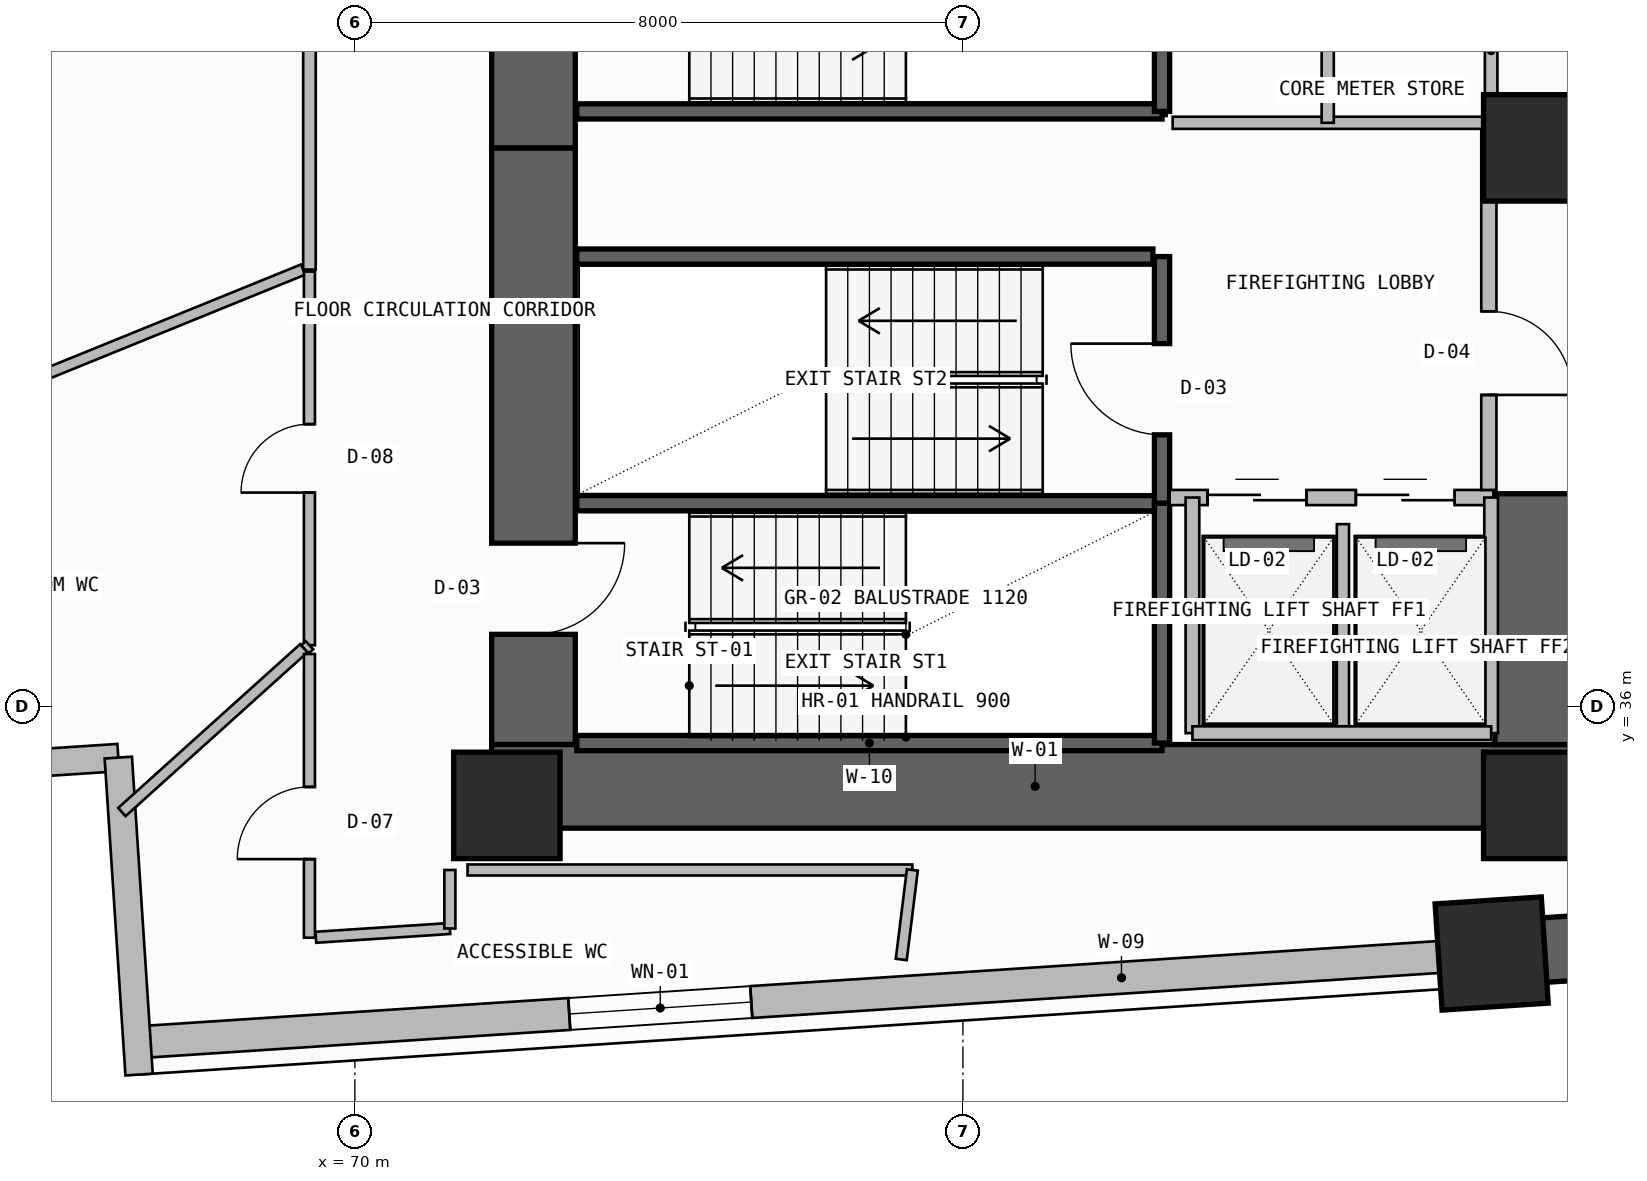
"""IFC4 building model, lengths in metres.
Left out: names, types, materials, properties, quantities, classifications, styles, units other than length and angle.
Written with IfcOpenShell. Run it as: python <this file> out.ifc"""

import sys

from ifc_helpers import new_model, si_unit, direction, frame, frame_2d, origin, origin_2d, place, context, subcontext, project, spatial, rectangle, extrude, element, fill, save


model = new_model("IFC4")
c1 = context("Model", 3, precision=1e-05, world=origin(), true_north=direction((0.0, 1.0)))
c2 = subcontext(c1, "Body", "Model", "MODEL_VIEW")
j1 = project(units=[si_unit("LENGTHUNIT", "METRE"), si_unit("PLANEANGLEUNIT", "RADIAN")], contexts=[c1])
p1 = place(None, origin())
s1 = spatial("IfcSite", under=j1, at=p1, CompositionType="ELEMENT")
p2 = place(p1, origin())
s2 = spatial("IfcBuilding", under=s1, at=p2, CompositionType="ELEMENT")
p3 = place(p2, frame((0.0, 0.0, 77.7)))
s3 = spatial("IfcBuildingStorey", under=s2, at=p3, CompositionType="ELEMENT", Elevation=77.7)
p4 = place(p3, frame((72.35, 35.5, -0.26), z_axis=(0.0, 0.0, 1.0), x_axis=(0.0, 1.0, 0.0)))
e1 = element("IfcWall", 1, at=p4, inside=s3, PredefinedType="SHEAR", context=c2, shape_type="SweptSolid", body=[
    extrude(rectangle(XDim=7.85, YDim=1.1, at=frame_2d((3.925, 0.0))), origin(), (0.0, 0.0, 1.0), 3.6),
])
p5 = place(p4, frame((1.45, 0.0, 0.26)))
e2 = element("IfcOpeningElement", 2, at=p5, cuts=e1, PredefinedType="OPENING", context=c2, shape_type="SweptSolid", body=[
    extrude(rectangle(XDim=1.2, YDim=2.2, at=frame_2d((0.6, 1.1))), frame((0.0, 0.56, 0.0), z_axis=(0.0, -1.0, 0.0), x_axis=(1.0, 0.0, 0.0)), (0.0, 0.0, 1.0), 1.12),
])
p6 = place(p3, frame((71.8, 34.95, -0.26), z_axis=(0.0, 0.0, 1.0), x_axis=(1.0, 0.0, 0.0)))
e3 = element("IfcWall", 3, at=p6, inside=s3, PredefinedType="SHEAR", context=c2, shape_type="SweptSolid", body=[
    extrude(rectangle(XDim=14.3, YDim=1.1, at=frame_2d((7.15, 0.0))), origin(), (0.0, 0.0, 1.0), 3.6),
])
p7 = place(p3, frame((85.55, 35.5, -0.26), z_axis=(0.0, 0.0, 1.0), x_axis=(0.0, 1.0, 0.0)))
e4 = element("IfcWall", 4, at=p7, inside=s3, PredefinedType="SHEAR", context=c2, shape_type="SweptSolid", body=[
    extrude(rectangle(XDim=3.3, YDim=1.1, at=frame_2d((1.65, 0.0))), origin(), (0.0, 0.0, 1.0), 3.6),
])
p8 = place(p3, frame((72.35, 43.35, -0.26), z_axis=(0.0, 0.0, 1.0), x_axis=(0.0, 1.0, 0.0)))
e5 = element("IfcWall", 5, at=p8, inside=s3, PredefinedType="SHEAR", context=c2, shape_type="SweptSolid", body=[
    extrude(rectangle(XDim=12.7, YDim=1.1, at=frame_2d((6.35, 0.0))), origin(), (0.0, 0.0, 1.0), 3.6),
])
p9 = place(p8, frame((1.35, 0.0, 0.26)))
e6 = element("IfcOpeningElement", 6, at=p9, cuts=e5, PredefinedType="OPENING", context=c2, shape_type="SweptSolid", body=[
    extrude(rectangle(XDim=1.2, YDim=2.2, at=frame_2d((0.6, 1.1))), frame((0.0, 0.56, 0.0), z_axis=(0.0, -1.0, 0.0), x_axis=(1.0, 0.0, 0.0)), (0.0, 0.0, 1.0), 1.12),
])
for number, where, z_axis, x_axis in (
    (7, (72.0, 34.7, 0.0), (0.0, 0.0, 1.0), (1.0, 0.0, 0.0)),
    (8, (85.55, 34.7, 0.0), (0.0, 0.0, 1.0), (1.0, 0.0, 0.0)),
    (9, (85.55, 43.35, 0.0), (0.0, 0.0, 1.0), (1.0, 0.0, 0.0)),
    (10, (84.957, 32.751, 0.0), (0.0, 0.0, 1.0), (0.998, 0.065, 0.0)),
):
    element("IfcColumn", number, at=place(p3, frame(where, z_axis=z_axis, x_axis=x_axis)), inside=s3, PredefinedType="COLUMN", context=c2, shape_type="SweptSolid", body=[
        extrude(rectangle(XDim=1.4, YDim=1.4, at=origin_2d()), origin(), (0.0, 0.0, 1.0), 3.6),
    ])
p10 = place(p3, frame((67.133, 31.583, 0.0), z_axis=(0.0, 0.0, 1.0), x_axis=(0.997859040617, 0.065401338356, 0.0)))
e11 = element("IfcWall", 11, at=p10, inside=s3, PredefinedType="SOLIDWALL", context=c2, shape_type="SweptSolid", body=[
    extrude(rectangle(XDim=17.862, YDim=0.42, at=frame_2d((8.931, 0.0))), origin(), (0.0, 0.0, 1.0), 2.325),
])
p11 = place(p10, frame((5.7, 0.0, 1.2)))
e12 = element("IfcOpeningElement", 12, at=p11, cuts=e11, PredefinedType="OPENING", context=c2, shape_type="SweptSolid", body=[
    extrude(rectangle(XDim=2.4, YDim=0.9, at=frame_2d((1.2, 0.45))), frame((0.0, 0.22, 0.0), z_axis=(0.0, -1.0, 0.0), x_axis=(1.0, 0.0, 0.0)), (0.0, 0.0, 1.0), 0.44),
])
p12 = place(p3, frame((84.957, 32.751, -0.26), z_axis=(0.0, 0.0, 1.0), x_axis=(0.997859046449, 0.065401249368, 0.0)))
e13 = element("IfcWall", 13, at=p12, inside=s3, PredefinedType="SHEAR", context=c2, shape_type="SweptSolid", body=[
    extrude(rectangle(XDim=28.4, YDim=0.85, at=frame_2d((14.2, 0.0))), origin(), (0.0, 0.0, 1.0), 3.6),
])
p13 = place(p12, frame((5.7, 0.0, 1.2)))
e14 = element("IfcOpeningElement", 14, at=p13, cuts=e13, PredefinedType="OPENING", context=c2, shape_type="SweptSolid", body=[
    extrude(rectangle(XDim=2.4, YDim=0.9, at=frame_2d((1.2, 0.45))), frame((0.0, 0.435, 0.0), z_axis=(0.0, -1.0, 0.0), x_axis=(1.0, 0.0, 0.0)), (0.0, 0.0, 1.0), 0.87),
])
p14 = place(p3, frame((62.718, 35.055, 0.0), z_axis=(0.0, 0.0, 1.0), x_axis=(0.997860761953, 0.065375069826, 0.0)))
e15 = element("IfcWall", 15, at=p14, inside=s3, PredefinedType="SOLIDWALL", context=c2, shape_type="SweptSolid", body=[
    extrude(rectangle(XDim=4.179, YDim=0.36, at=frame_2d((2.089, 0.0))), origin(), (0.0, 0.0, 1.0), 3.34),
])
p15 = place(p14, frame((1.714, 0.0, 0.45)))
e16 = element("IfcOpeningElement", 16, at=p15, cuts=e15, PredefinedType="OPENING", context=c2, shape_type="SweptSolid", body=[
    extrude(rectangle(XDim=1.3, YDim=2.4, at=frame_2d((0.65, 1.2))), frame((0.0, 0.19, 0.0), z_axis=(0.0, -1.0, 0.0), x_axis=(1.0, 0.0, 0.0)), (0.0, 0.0, 1.0), 0.38),
])
p16 = place(p3, frame((66.887, 35.329, 0.0), z_axis=(0.0, 0.0, 1.0), x_axis=(0.065433242561, -0.99785694905, 0.0)))
e17 = element("IfcWall", 17, at=p16, inside=s3, PredefinedType="SOLIDWALL", context=c2, shape_type="SweptSolid", body=[
    extrude(rectangle(XDim=4.179, YDim=0.36, at=frame_2d((2.089, 0.0))), origin(), (0.0, 0.0, 1.0), 3.34),
])
for number, where, z_axis, x_axis in (
    (18, (72.92, 35.52, -0.26), (0.0, 0.0, 1.0), (1.0, 0.0, 0.0)),
    (19, (72.92, 38.675, -0.26), (0.0, 0.0, 1.0), (1.0, 0.0, 0.0)),
):
    element("IfcWall", number, at=place(p3, frame(where, z_axis=z_axis, x_axis=x_axis)), inside=s3, PredefinedType="SOLIDWALL", context=c2, shape_type="SweptSolid", body=[
        extrude(rectangle(XDim=7.7, YDim=0.2, at=frame_2d((3.85, 0.0))), origin(), (0.0, 0.0, 1.0), 3.6),
    ])
p17 = place(p3, frame((80.62, 35.52, -0.26), z_axis=(0.0, 0.0, 1.0), x_axis=(0.0, 1.0, 0.0)))
e20 = element("IfcWall", 20, at=p17, inside=s3, PredefinedType="SOLIDWALL", context=c2, shape_type="SweptSolid", body=[
    extrude(rectangle(XDim=3.155, YDim=0.2, at=frame_2d((1.578, 0.0))), origin(), (0.0, 0.0, 1.0), 3.6),
])
p18 = place(p3, frame((80.62, 38.675, -0.26), z_axis=(0.0, 0.0, 1.0), x_axis=(0.0, 1.0, 0.0)))
e21 = element("IfcWall", 21, at=p18, inside=s3, PredefinedType="SOLIDWALL", context=c2, shape_type="SweptSolid", body=[
    extrude(rectangle(XDim=3.245, YDim=0.2, at=frame_2d((1.623, 0.0))), origin(), (0.0, 0.0, 1.0), 3.6),
])
p19 = place(p18, frame((0.9, 0.0, 0.26)))
e22 = element("IfcOpeningElement", 22, at=p19, cuts=e21, PredefinedType="OPENING", context=c2, shape_type="SweptSolid", body=[
    extrude(rectangle(XDim=1.2, YDim=2.2, at=frame_2d((0.6, 1.1))), frame((0.0, 0.11, 0.0), z_axis=(0.0, -1.0, 0.0), x_axis=(1.0, 0.0, 0.0)), (0.0, 0.0, 1.0), 0.22),
])
p20 = place(p3, frame((80.72, 38.75, 0.0), z_axis=(0.0, 0.0, 1.0), x_axis=(1.0, 0.0, 0.0)))
e23 = element("IfcWall", 23, at=p20, inside=s3, PredefinedType="SOLIDWALL", context=c2, shape_type="SweptSolid", body=[
    extrude(rectangle(XDim=4.26, YDim=0.2, at=frame_2d((2.13, 0.0))), origin(), (0.0, 0.0, 1.0), 3.34),
])
p21 = place(p20, frame((0.5, 0.0, 0.0)))
e24 = element("IfcOpeningElement", 24, at=p21, cuts=e23, PredefinedType="OPENING", context=c2, shape_type="SweptSolid", body=[
    extrude(rectangle(XDim=1.3, YDim=2.3, at=frame_2d((0.65, 1.15))), frame((0.0, 0.11, 0.0), z_axis=(0.0, -1.0, 0.0), x_axis=(1.0, 0.0, 0.0)), (0.0, 0.0, 1.0), 0.22),
])
p22 = place(p20, frame((2.45, 0.0, 0.0)))
e25 = element("IfcOpeningElement", 25, at=p22, cuts=e23, PredefinedType="OPENING", context=c2, shape_type="SweptSolid", body=[
    extrude(rectangle(XDim=1.3, YDim=2.3, at=frame_2d((0.65, 1.15))), frame((0.0, 0.11, 0.0), z_axis=(0.0, -1.0, 0.0), x_axis=(1.0, 0.0, 0.0)), (0.0, 0.0, 1.0), 0.22),
])
p23 = place(p3, frame((83.0, 35.65, 0.0), z_axis=(0.0, 0.0, 1.0), x_axis=(0.0, 1.0, 0.0)))
e26 = element("IfcWall", 26, at=p23, inside=s3, PredefinedType="PLUMBINGWALL", context=c2, shape_type="SweptSolid", body=[
    extrude(rectangle(XDim=2.75, YDim=0.16, at=frame_2d((1.375, 0.0))), origin(), (0.0, 0.0, 1.0), 3.34),
])
for number, where, z_axis, x_axis in (
    (27, (84.95, 35.65, 0.0), (0.0, 0.0, 1.0), (0.0, 1.0, 0.0)),
    (28, (81.02, 35.65, 0.0), (0.0, 0.0, 1.0), (0.0, 1.0, 0.0)),
):
    element("IfcWall", number, at=place(p3, frame(where, z_axis=z_axis, x_axis=x_axis)), inside=s3, PredefinedType="SOLIDWALL", context=c2, shape_type="SweptSolid", body=[
        extrude(rectangle(XDim=3.1, YDim=0.18, at=frame_2d((1.55, 0.0))), origin(), (0.0, 0.0, 1.0), 3.34),
    ])
p24 = place(p3, frame((81.02, 35.65, 0.0), z_axis=(0.0, 0.0, 1.0), x_axis=(1.0, 0.0, 0.0)))
e29 = element("IfcWall", 29, at=p24, inside=s3, PredefinedType="SOLIDWALL", context=c2, shape_type="SweptSolid", body=[
    extrude(rectangle(XDim=3.93, YDim=0.18, at=frame_2d((1.965, 0.0))), origin(), (0.0, 0.0, 1.0), 3.34),
])
p25 = place(p3, frame((84.92, 38.85, 0.0), z_axis=(0.0, 0.0, 1.0), x_axis=(0.0, 1.0, 0.0)))
e30 = element("IfcWall", 30, at=p25, inside=s3, PredefinedType="SOLIDWALL", context=c2, shape_type="SweptSolid", body=[
    extrude(rectangle(XDim=4.83, YDim=0.2, at=frame_2d((2.415, 0.0))), origin(), (0.0, 0.0, 1.0), 3.34),
])
p26 = place(p25, frame((1.25, 0.0, 0.0)))
e31 = element("IfcOpeningElement", 31, at=p26, cuts=e30, PredefinedType="OPENING", context=c2, shape_type="SweptSolid", body=[
    extrude(rectangle(XDim=1.1, YDim=2.2, at=frame_2d((0.55, 1.1))), frame((0.0, 0.11, 0.0), z_axis=(0.0, -1.0, 0.0), x_axis=(1.0, 0.0, 0.0)), (0.0, 0.0, 1.0), 0.22),
])
p27 = place(p3, frame((72.92, 41.92, -0.26), z_axis=(0.0, 0.0, 1.0), x_axis=(1.0, 0.0, 0.0)))
e32 = element("IfcWall", 32, at=p27, inside=s3, PredefinedType="SOLIDWALL", context=c2, shape_type="SweptSolid", body=[
    extrude(rectangle(XDim=7.58, YDim=0.2, at=frame_2d((3.79, 0.0))), origin(), (0.0, 0.0, 1.0), 3.6),
])
p28 = place(p3, frame((72.92, 43.83, -0.26), z_axis=(0.0, 0.0, 1.0), x_axis=(1.0, 0.0, 0.0)))
e33 = element("IfcWall", 33, at=p28, inside=s3, PredefinedType="SOLIDWALL", context=c2, shape_type="SweptSolid", body=[
    extrude(rectangle(XDim=7.7, YDim=0.2, at=frame_2d((3.85, 0.0))), origin(), (0.0, 0.0, 1.0), 3.6),
])
p29 = place(p3, frame((80.62, 43.83, -0.26), z_axis=(0.0, 0.0, 1.0), x_axis=(0.0, 1.0, 0.0)))
e34 = element("IfcWall", 34, at=p29, inside=s3, PredefinedType="SOLIDWALL", context=c2, shape_type="SweptSolid", body=[
    extrude(rectangle(XDim=3.24, YDim=0.2, at=frame_2d((1.62, 0.0))), origin(), (0.0, 0.0, 1.0), 3.6),
])
p30 = place(p3, frame((84.95, 43.68, 0.0), z_axis=(0.0, 0.0, 1.0), x_axis=(0.0, 1.0, 0.0)))
e35 = element("IfcWall", 35, at=p30, inside=s3, PredefinedType="PLUMBINGWALL", context=c2, shape_type="SweptSolid", body=[
    extrude(rectangle(XDim=1.9, YDim=0.165, at=frame_2d((0.95, 0.0))), origin(), (0.0, 0.0, 1.0), 3.34),
])
p31 = place(p3, frame((80.76, 43.68, 0.0), z_axis=(0.0, 0.0, 1.0), x_axis=(1.0, 0.0, 0.0)))
e36 = element("IfcWall", 36, at=p31, inside=s3, PredefinedType="PLUMBINGWALL", context=c2, shape_type="SweptSolid", body=[
    extrude(rectangle(XDim=4.19, YDim=0.16, at=frame_2d((2.095, 0.0))), origin(), (0.0, 0.0, 1.0), 3.34),
])
p32 = place(p3, frame((82.8, 43.68, 0.0), z_axis=(0.0, 0.0, 1.0), x_axis=(0.0, 1.0, 0.0)))
e37 = element("IfcWall", 37, at=p32, inside=s3, PredefinedType="PLUMBINGWALL", context=c2, shape_type="SweptSolid", body=[
    extrude(rectangle(XDim=1.9, YDim=0.16, at=frame_2d((0.95, 0.0))), origin(), (0.0, 0.0, 1.0), 3.34),
])
p33 = place(p3, frame((69.403, 48.542, 0.0), z_axis=(0.0, 0.0, 1.0), x_axis=(0.0, -1.0, 0.0)))
e38 = element("IfcWall", 38, at=p33, inside=s3, PredefinedType="PARTITIONING", context=c2, shape_type="SweptSolid", body=[
    extrude(rectangle(XDim=6.792, YDim=0.165, at=frame_2d((3.396, 0.0))), origin(), (0.0, 0.0, 1.0), 3.34),
])
p34 = place(p33, frame((2.896, 0.0, 0.0)))
e39 = element("IfcOpeningElement", 39, at=p34, cuts=e38, PredefinedType="OPENING", context=c2, shape_type="SweptSolid", body=[
    extrude(rectangle(XDim=1.0, YDim=2.2, at=frame_2d((0.5, 1.1))), frame((0.0, 0.093, 0.0), z_axis=(0.0, -1.0, 0.0), x_axis=(1.0, 0.0, 0.0)), (0.0, 0.0, 1.0), 0.185),
])
p35 = place(p3, frame((69.319, 41.749, 0.0), z_axis=(0.0, 0.0, 1.0), x_axis=(-0.926394680215, -0.376553975506, 0.0)))
e40 = element("IfcWall", 40, at=p35, inside=s3, PredefinedType="PARTITIONING", context=c2, shape_type="SweptSolid", body=[
    extrude(rectangle(XDim=7.402, YDim=0.145, at=frame_2d((3.701, 0.0))), origin(), (0.0, 0.0, 1.0), 3.34),
])
p36 = place(p3, frame((69.403, 41.723, 0.0), z_axis=(0.0, 0.0, 1.0), x_axis=(0.0, -1.0, 0.0)))
e41 = element("IfcWall", 41, at=p36, inside=s3, PredefinedType="PARTITIONING", context=c2, shape_type="SweptSolid", body=[
    extrude(rectangle(XDim=4.916, YDim=0.145, at=frame_2d((2.458, 0.0))), origin(), (0.0, 0.0, 1.0), 3.34),
])
p37 = place(p36, frame((2.008, 0.0, 0.0)))
e42 = element("IfcOpeningElement", 42, at=p37, cuts=e41, PredefinedType="OPENING", context=c2, shape_type="SweptSolid", body=[
    extrude(rectangle(XDim=0.9, YDim=2.1, at=frame_2d((0.45, 1.05))), frame((0.0, 0.083, 0.0), z_axis=(0.0, -1.0, 0.0), x_axis=(1.0, 0.0, 0.0)), (0.0, 0.0, 1.0), 0.165),
])
p38 = place(p3, frame((69.403, 36.807, 0.0), z_axis=(0.0, 0.0, 1.0), x_axis=(-0.730462531297, -0.682952773164, 0.0)))
e43 = element("IfcWall", 43, at=p38, inside=s3, PredefinedType="PARTITIONING", context=c2, shape_type="SweptSolid", body=[
    extrude(rectangle(XDim=0.082, YDim=0.145, at=frame_2d((0.041, 0.0))), origin(), (0.0, 0.0, 1.0), 3.34),
])
p39 = place(p3, frame((69.328, 36.767, 0.0), z_axis=(0.0, 0.0, 1.0), x_axis=(-0.743211196689, -0.669056886308, 0.0)))
e44 = element("IfcWall", 44, at=p39, inside=s3, PredefinedType="PARTITIONING", context=c2, shape_type="SweptSolid", body=[
    extrude(rectangle(XDim=3.22, YDim=0.145, at=frame_2d((1.61, 0.0))), origin(), (0.0, 0.0, 1.0), 3.34),
])
p40 = place(p3, frame((69.403, 36.691, 0.0), z_axis=(0.0, 0.0, 1.0), x_axis=(0.0, -1.0, 0.0)))
e45 = element("IfcWall", 45, at=p40, inside=s3, PredefinedType="PARTITIONING", context=c2, shape_type="SweptSolid", body=[
    extrude(rectangle(XDim=3.732, YDim=0.145, at=frame_2d((1.866, 0.0))), origin(), (0.0, 0.0, 1.0), 3.34),
])
p41 = place(p40, frame((1.748, 0.0, 0.0)))
e46 = element("IfcOpeningElement", 46, at=p41, cuts=e45, PredefinedType="OPENING", context=c2, shape_type="SweptSolid", body=[
    extrude(rectangle(XDim=0.95, YDim=2.15, at=frame_2d((0.475, 1.075))), frame((0.0, 0.083, 0.0), z_axis=(0.0, -1.0, 0.0), x_axis=(1.0, 0.0, 0.0)), (0.0, 0.0, 1.0), 0.165),
])
p42 = place(p3, frame((69.487, 32.965, 0.0), z_axis=(0.0, 0.0, 1.0), x_axis=(0.99786153194, 0.065363315968, 0.0)))
e47 = element("IfcWall", 47, at=p42, inside=s3, PredefinedType="PARTITIONING", context=c2, shape_type="SweptSolid", body=[
    extrude(rectangle(XDim=1.767, YDim=0.145, at=frame_2d((0.883, 0.0))), origin(), (0.0, 0.0, 1.0), 3.34),
])
p43 = place(p3, frame((71.25, 33.08, 0.0), z_axis=(0.0, 0.0, 1.0), x_axis=(0.0, 1.0, 0.0)))
e48 = element("IfcWall", 48, at=p43, inside=s3, PredefinedType="PARTITIONING", context=c2, shape_type="SweptSolid", body=[
    extrude(rectangle(XDim=0.77, YDim=0.145, at=frame_2d((0.385, 0.0))), origin(), (0.0, 0.0, 1.0), 3.34),
])
p44 = place(p3, frame((71.482, 33.85, 0.0), z_axis=(0.0, 0.0, 1.0), x_axis=(1.0, 0.0, 0.0)))
e49 = element("IfcWall", 49, at=p44, inside=s3, PredefinedType="PARTITIONING", context=c2, shape_type="SweptSolid", body=[
    extrude(rectangle(XDim=5.852, YDim=0.145, at=frame_2d((2.926, 0.0))), origin(), (0.0, 0.0, 1.0), 3.34),
])
p45 = place(p3, frame((77.335, 33.85, 0.0), z_axis=(0.0, 0.0, 1.0), x_axis=(-0.122641676456, -0.992451016018, 0.0)))
e50 = element("IfcWall", 50, at=p45, inside=s3, PredefinedType="PARTITIONING", context=c2, shape_type="SweptSolid", body=[
    extrude(rectangle(XDim=1.187, YDim=0.145, at=frame_2d((0.593, 0.0))), origin(), (0.0, 0.0, 1.0), 3.34),
])
p46 = place(p11, origin())
e51 = element("IfcWindow", 51, at=p46, inside=s3, PartitioningType="SINGLE_PANEL", PredefinedType="WINDOW", context=c2, shape_type="SweptSolid", body=[
    extrude(rectangle(XDim=2.4, YDim=0.9, at=frame_2d((1.2, 0.45))), frame((0.0, 0.03, 0.0), z_axis=(0.0, -1.0, 0.0), x_axis=(1.0, 0.0, 0.0)), (0.0, 0.0, 1.0), 0.06),
])
fill(e12, e51)
p47 = place(p5, frame((1.2, 0.0, 0.0), z_axis=(0.0, 0.0, 1.0), x_axis=(-1.0, 0.0, 0.0)))
e52 = element("IfcDoor", 52, at=p47, inside=s3, OperationType="SINGLE_SWING_LEFT", PredefinedType="USERDEFINED", context=c2, shape_type="SweptSolid", body=[
    extrude(rectangle(XDim=1.2, YDim=2.2, at=frame_2d((0.6, 1.1))), frame((0.0, 0.025, 0.0), z_axis=(0.0, -1.0, 0.0), x_axis=(1.0, 0.0, 0.0)), (0.0, 0.0, 1.0), 0.05),
])
fill(e2, e52)
p48 = place(p19, origin())
e53 = element("IfcDoor", 53, at=p48, inside=s3, OperationType="SINGLE_SWING_RIGHT", PredefinedType="USERDEFINED", context=c2, shape_type="SweptSolid", body=[
    extrude(rectangle(XDim=1.2, YDim=2.2, at=frame_2d((0.6, 1.1))), frame((0.0, 0.025, 0.0), z_axis=(0.0, -1.0, 0.0), x_axis=(1.0, 0.0, 0.0)), (0.0, 0.0, 1.0), 0.05),
])
fill(e22, e53)
p49 = place(p21, origin())
e54 = element("IfcDoor", 54, at=p49, inside=s3, OperationType="DOUBLE_DOOR_SLIDING", PredefinedType="DOOR", context=c2, shape_type="SweptSolid", body=[
    extrude(rectangle(XDim=1.3, YDim=2.3, at=frame_2d((0.65, 1.15))), frame((0.0, 0.025, 0.0), z_axis=(0.0, -1.0, 0.0), x_axis=(1.0, 0.0, 0.0)), (0.0, 0.0, 1.0), 0.05),
])
fill(e24, e54)
p50 = place(p22, origin())
e55 = element("IfcDoor", 55, at=p50, inside=s3, OperationType="DOUBLE_DOOR_SLIDING", PredefinedType="DOOR", context=c2, shape_type="SweptSolid", body=[
    extrude(rectangle(XDim=1.3, YDim=2.3, at=frame_2d((0.65, 1.15))), frame((0.0, 0.025, 0.0), z_axis=(0.0, -1.0, 0.0), x_axis=(1.0, 0.0, 0.0)), (0.0, 0.0, 1.0), 0.05),
])
fill(e25, e55)
p51 = place(p26, frame((1.1, 0.0, 0.0), z_axis=(0.0, 0.0, 1.0), x_axis=(-1.0, 0.0, 0.0)))
e56 = element("IfcDoor", 56, at=p51, inside=s3, OperationType="SINGLE_SWING_RIGHT", PredefinedType="DOOR", context=c2, shape_type="SweptSolid", body=[
    extrude(rectangle(XDim=1.1, YDim=2.2, at=frame_2d((0.55, 1.1))), frame((0.0, 0.025, 0.0), z_axis=(0.0, -1.0, 0.0), x_axis=(1.0, 0.0, 0.0)), (0.0, 0.0, 1.0), 0.05),
])
fill(e31, e56)
p52 = place(p37, frame((0.9, 0.0, 0.0), z_axis=(0.0, 0.0, 1.0), x_axis=(-1.0, 0.0, 0.0)))
e57 = element("IfcDoor", 57, at=p52, inside=s3, OperationType="SINGLE_SWING_LEFT", PredefinedType="DOOR", context=c2, shape_type="SweptSolid", body=[
    extrude(rectangle(XDim=0.9, YDim=2.1, at=frame_2d((0.45, 1.05))), frame((0.0, 0.025, 0.0), z_axis=(0.0, -1.0, 0.0), x_axis=(1.0, 0.0, 0.0)), (0.0, 0.0, 1.0), 0.05),
])
fill(e42, e57)
p53 = place(p41, frame((0.95, 0.0, 0.0), z_axis=(0.0, 0.0, 1.0), x_axis=(-1.0, 0.0, 0.0)))
e58 = element("IfcDoor", 58, at=p53, inside=s3, OperationType="SINGLE_SWING_LEFT", PredefinedType="DOOR", context=c2, shape_type="SweptSolid", body=[
    extrude(rectangle(XDim=0.95, YDim=2.15, at=frame_2d((0.475, 1.075))), frame((0.0, 0.025, 0.0), z_axis=(0.0, -1.0, 0.0), x_axis=(1.0, 0.0, 0.0)), (0.0, 0.0, 1.0), 0.05),
])
fill(e46, e58)
save(model, sys.argv[1])
